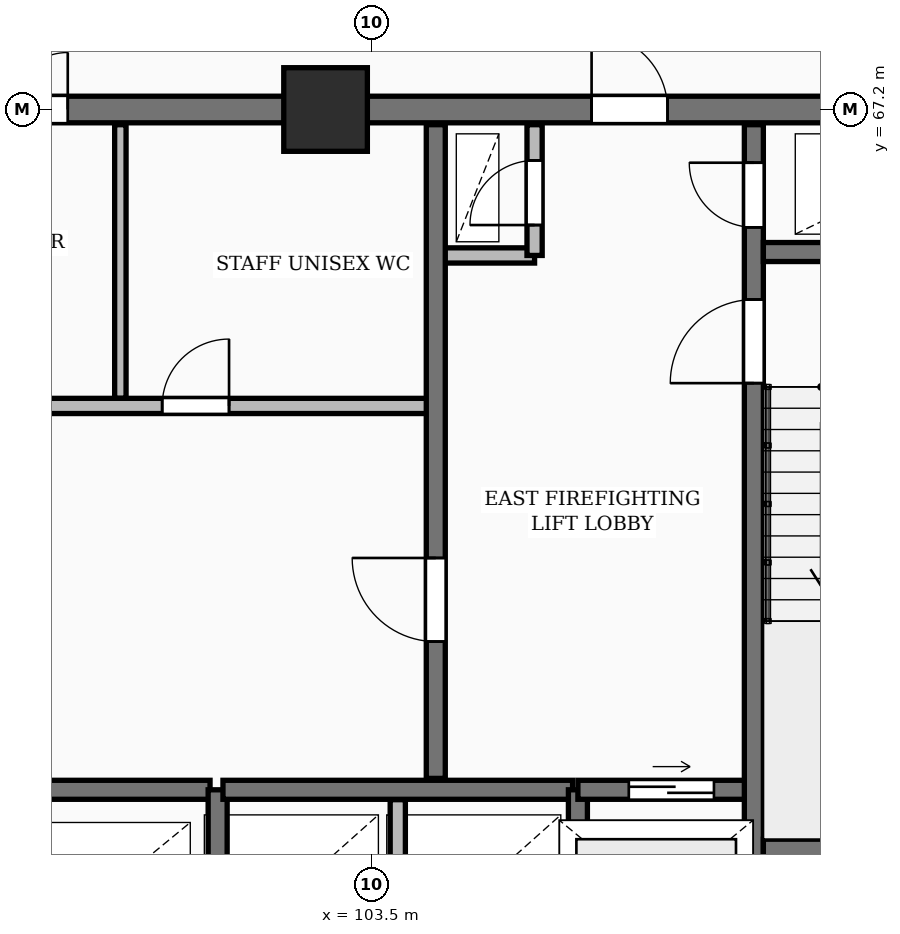
"""IFC4 building model, lengths in metres.
Left out: names, types, materials, properties, quantities, classifications, styles, units other than length and angle.
Written with IfcOpenShell. Run it as: python <this file> out.ifc"""

import sys

from ifc_helpers import new_model, si_unit, direction, frame, frame_2d, origin, origin_2d, place, context, subcontext, project, spatial, rectangle, extrude, element, fill, save


model = new_model("IFC4")
c1 = context("Model", 3, precision=1e-05, world=origin(), true_north=direction((0.0, 1.0)))
c2 = subcontext(c1, "Body", "Model", "MODEL_VIEW")
j1 = project(units=[si_unit("LENGTHUNIT", "METRE"), si_unit("PLANEANGLEUNIT", "RADIAN")], contexts=[c1])
p1 = place(None, origin())
s1 = spatial("IfcSite", under=j1, at=p1, CompositionType="ELEMENT")
p2 = place(p1, origin())
s2 = spatial("IfcBuilding", under=s1, at=p2, CompositionType="ELEMENT")
p3 = place(p2, frame((0.0, 0.0, 10.0)))
s3 = spatial("IfcBuildingStorey", under=s2, at=p3, CompositionType="ELEMENT", Elevation=10.0)
p4 = place(p3, frame((102.9, 67.2, 0.0), z_axis=(0.0, 0.0, 1.0), x_axis=(1.0, 0.0, 0.0)))
e1 = element("IfcColumn", 1, at=p4, inside=s3, PredefinedType="COLUMN", context=c2, shape_type="SweptSolid", body=[
    extrude(rectangle(XDim=1.1, YDim=1.1, at=origin_2d()), origin(), (0.0, 0.0, 1.0), 4.5),
])
p5 = place(p3, frame((75.95, 67.2, 0.0), z_axis=(0.0, 0.0, 1.0), x_axis=(1.0, 0.0, 0.0)))
e2 = element("IfcWall", 2, at=p5, inside=s3, PredefinedType="SHEAR", context=c2, shape_type="SweptSolid", body=[
    extrude(rectangle(XDim=36.3, YDim=0.35, at=frame_2d((18.15, 0.0))), origin(), (0.0, 0.0, 1.0), 4.5),
])
p6 = place(p5, frame((5.788, 0.0, 0.0)))
e3 = element("IfcOpeningElement", 3, at=p6, cuts=e2, PredefinedType="OPENING", context=c2, shape_type="SweptSolid", body=[
    extrude(rectangle(XDim=1.0, YDim=2.15, at=frame_2d((0.5, 1.075))), frame((0.0, 0.185, 0.0), z_axis=(0.0, -1.0, 0.0), x_axis=(1.0, 0.0, 0.0)), (0.0, 0.0, 1.0), 0.37),
])
p7 = place(p5, frame((22.058, 0.0, 0.0)))
e4 = element("IfcOpeningElement", 4, at=p7, cuts=e2, PredefinedType="OPENING", context=c2, shape_type="SweptSolid", body=[
    extrude(rectangle(XDim=1.5, YDim=2.2, at=frame_2d((0.75, 1.1))), frame((0.0, 0.185, 0.0), z_axis=(0.0, -1.0, 0.0), x_axis=(1.0, 0.0, 0.0)), (0.0, 0.0, 1.0), 0.37),
])
p8 = place(p5, frame((30.45, 0.0, 0.0)))
e5 = element("IfcOpeningElement", 5, at=p8, cuts=e2, PredefinedType="OPENING", context=c2, shape_type="SweptSolid", body=[
    extrude(rectangle(XDim=1.0, YDim=2.15, at=frame_2d((0.5, 1.075))), frame((0.0, 0.185, 0.0), z_axis=(0.0, -1.0, 0.0), x_axis=(1.0, 0.0, 0.0)), (0.0, 0.0, 1.0), 0.37),
])
p9 = place(p3, frame((93.02, 58.25, 0.0), z_axis=(0.0, 0.0, 1.0), x_axis=(1.0, 0.0, 0.0)))
e6 = element("IfcWall", 6, at=p9, inside=s3, PredefinedType="SHEAR", context=c2, shape_type="SweptSolid", body=[
    extrude(rectangle(XDim=8.36, YDim=0.25, at=frame_2d((4.18, 0.0))), origin(), (0.0, 0.0, 1.0), 4.5),
])
p10 = place(p3, frame((101.48, 55.4, 0.0), z_axis=(0.0, 0.0, 1.0), x_axis=(0.0, 1.0, 0.0)))
e7 = element("IfcWall", 7, at=p10, inside=s3, PredefinedType="SHEAR", context=c2, shape_type="SweptSolid", body=[
    extrude(rectangle(XDim=2.85, YDim=0.25, at=frame_2d((1.425, 0.0))), origin(), (0.0, 0.0, 1.0), 4.5),
])
p11 = place(p3, frame((103.85, 55.4, 0.0), z_axis=(0.0, 0.0, 1.0), x_axis=(0.0, 1.0, 0.0)))
e8 = element("IfcWall", 8, at=p11, inside=s3, PredefinedType="PARTITIONING", context=c2, shape_type="SweptSolid", body=[
    extrude(rectangle(XDim=2.72, YDim=0.2, at=frame_2d((1.36, 0.0))), origin(), (0.0, 0.0, 1.0), 4.2),
])
p12 = place(p3, frame((101.55, 58.25, 0.0), z_axis=(0.0, 0.0, 1.0), x_axis=(1.0, 0.0, 0.0)))
e9 = element("IfcWall", 9, at=p12, inside=s3, PredefinedType="SHEAR", context=c2, shape_type="SweptSolid", body=[
    extrude(rectangle(XDim=4.6, YDim=0.25, at=frame_2d((2.3, 0.0))), origin(), (0.0, 0.0, 1.0), 4.5),
])
p13 = place(p3, frame((106.22, 55.4, 0.0), z_axis=(0.0, 0.0, 1.0), x_axis=(0.0, 1.0, 0.0)))
e10 = element("IfcWall", 10, at=p13, inside=s3, PredefinedType="SHEAR", context=c2, shape_type="SweptSolid", body=[
    extrude(rectangle(XDim=2.85, YDim=0.25, at=frame_2d((1.425, 0.0))), origin(), (0.0, 0.0, 1.0), 4.5),
])
p14 = place(p3, frame((106.22, 58.25, 0.0), z_axis=(0.0, 0.0, 1.0), x_axis=(1.0, 0.0, 0.0)))
e11 = element("IfcWall", 11, at=p14, inside=s3, PredefinedType="SHEAR", context=c2, shape_type="SweptSolid", body=[
    extrude(rectangle(XDim=2.46, YDim=0.25, at=frame_2d((1.23, 0.0))), origin(), (0.0, 0.0, 1.0), 4.5),
])
p15 = place(p14, frame((0.67, 0.0, 0.0)))
e12 = element("IfcOpeningElement", 12, at=p15, cuts=e11, PredefinedType="OPENING", context=c2, shape_type="SweptSolid", body=[
    extrude(rectangle(XDim=1.12, YDim=2.12, at=frame_2d((0.56, 1.06))), frame((0.0, 0.135, 0.0), z_axis=(0.0, -1.0, 0.0), x_axis=(1.0, 0.0, 0.0)), (0.0, 0.0, 1.0), 0.27),
])
p16 = place(p3, frame((100.2, 63.4, 0.0), z_axis=(0.0, 0.0, 1.0), x_axis=(0.0, 1.0, 0.0)))
e13 = element("IfcWall", 13, at=p16, inside=s3, PredefinedType="PARTITIONING", context=c2, shape_type="SweptSolid", body=[
    extrude(rectangle(XDim=3.6, YDim=0.15, at=frame_2d((1.8, 0.0))), origin(), (0.0, 0.0, 1.0), 4.2),
])
p17 = place(p3, frame((84.42, 63.3, 0.0), z_axis=(0.0, 0.0, 1.0), x_axis=(1.0, 0.0, 0.0)))
e14 = element("IfcWall", 14, at=p17, inside=s3, PredefinedType="PARTITIONING", context=c2, shape_type="SweptSolid", body=[
    extrude(rectangle(XDim=19.83, YDim=0.2, at=frame_2d((9.915, 0.0))), origin(), (0.0, 0.0, 1.0), 4.2),
])
p18 = place(p17, frame((1.15, 0.0, 0.0)))
e15 = element("IfcOpeningElement", 15, at=p18, cuts=e14, PredefinedType="OPENING", context=c2, shape_type="SweptSolid", body=[
    extrude(rectangle(XDim=0.85, YDim=2.05, at=frame_2d((0.425, 1.025))), frame((0.0, 0.11, 0.0), z_axis=(0.0, -1.0, 0.0), x_axis=(1.0, 0.0, 0.0)), (0.0, 0.0, 1.0), 0.22),
])
p19 = place(p17, frame((3.25, 0.0, 0.0)))
e16 = element("IfcOpeningElement", 16, at=p19, cuts=e14, PredefinedType="OPENING", context=c2, shape_type="SweptSolid", body=[
    extrude(rectangle(XDim=0.85, YDim=2.05, at=frame_2d((0.425, 1.025))), frame((0.0, 0.11, 0.0), z_axis=(0.0, -1.0, 0.0), x_axis=(1.0, 0.0, 0.0)), (0.0, 0.0, 1.0), 0.22),
])
p20 = place(p17, frame((13.08, 0.0, 0.0)))
e17 = element("IfcOpeningElement", 17, at=p20, cuts=e14, PredefinedType="OPENING", context=c2, shape_type="SweptSolid", body=[
    extrude(rectangle(XDim=1.5, YDim=2.2, at=frame_2d((0.75, 1.1))), frame((0.0, 0.11, 0.0), z_axis=(0.0, -1.0, 0.0), x_axis=(1.0, 0.0, 0.0)), (0.0, 0.0, 1.0), 0.22),
])
p21 = place(p17, frame((6.68, 0.0, 0.0)))
e18 = element("IfcOpeningElement", 18, at=p21, cuts=e14, PredefinedType="OPENING", context=c2, shape_type="SweptSolid", body=[
    extrude(rectangle(XDim=0.92, YDim=2.08, at=frame_2d((0.46, 1.04))), frame((0.0, 0.11, 0.0), z_axis=(0.0, -1.0, 0.0), x_axis=(1.0, 0.0, 0.0)), (0.0, 0.0, 1.0), 0.22),
])
p22 = place(p17, frame((16.33, 0.0, 0.0)))
e19 = element("IfcOpeningElement", 19, at=p22, cuts=e14, PredefinedType="OPENING", context=c2, shape_type="SweptSolid", body=[
    extrude(rectangle(XDim=0.88, YDim=2.06, at=frame_2d((0.44, 1.03))), frame((0.0, 0.11, 0.0), z_axis=(0.0, -1.0, 0.0), x_axis=(1.0, 0.0, 0.0)), (0.0, 0.0, 1.0), 0.22),
])
p23 = place(p3, frame((104.45, 65.28, 0.0), z_axis=(0.0, 0.0, 1.0), x_axis=(1.0, 0.0, 0.0)))
e20 = element("IfcWall", 20, at=p23, inside=s3, PredefinedType="PARTITIONING", context=c2, shape_type="SweptSolid", body=[
    extrude(rectangle(XDim=1.2, YDim=0.2, at=frame_2d((0.6, 0.0))), origin(), (0.0, 0.0, 1.0), 4.2),
])
p24 = place(p3, frame((105.65, 65.28, 0.0), z_axis=(0.0, 0.0, 1.0), x_axis=(0.0, 1.0, 0.0)))
e21 = element("IfcWall", 21, at=p24, inside=s3, PredefinedType="PARTITIONING", context=c2, shape_type="SweptSolid", body=[
    extrude(rectangle(XDim=1.72, YDim=0.2, at=frame_2d((0.86, 0.0))), origin(), (0.0, 0.0, 1.0), 4.2),
])
p25 = place(p24, frame((0.4, 0.0, 0.0)))
e22 = element("IfcOpeningElement", 22, at=p25, cuts=e21, PredefinedType="OPENING", context=c2, shape_type="SweptSolid", body=[
    extrude(rectangle(XDim=0.85, YDim=2.05, at=frame_2d((0.425, 1.025))), frame((0.0, 0.11, 0.0), z_axis=(0.0, -1.0, 0.0), x_axis=(1.0, 0.0, 0.0)), (0.0, 0.0, 1.0), 0.22),
])
p26 = place(p3, frame((104.35, 58.4, 0.0), z_axis=(0.0, 0.0, 1.0), x_axis=(0.0, 1.0, 0.0)))
e23 = element("IfcWall", 23, at=p26, inside=s3, PredefinedType="SHEAR", context=c2, shape_type="SweptSolid", body=[
    extrude(rectangle(XDim=8.6, YDim=0.25, at=frame_2d((4.3, 0.0))), origin(), (0.0, 0.0, 1.0), 4.5),
])
p27 = place(p26, frame((1.8, 0.0, 0.0)))
e24 = element("IfcOpeningElement", 24, at=p27, cuts=e23, PredefinedType="OPENING", context=c2, shape_type="SweptSolid", body=[
    extrude(rectangle(XDim=1.1, YDim=2.1, at=frame_2d((0.55, 1.05))), frame((0.0, 0.135, 0.0), z_axis=(0.0, -1.0, 0.0), x_axis=(1.0, 0.0, 0.0)), (0.0, 0.0, 1.0), 0.27),
])
p28 = place(p3, frame((108.535, 55.4, 0.0), z_axis=(0.0, 0.0, 1.0), x_axis=(0.0, 1.0, 0.0)))
e25 = element("IfcWall", 25, at=p28, inside=s3, PredefinedType="SHEAR", context=c2, shape_type="SweptSolid", body=[
    extrude(rectangle(XDim=11.6, YDim=0.25, at=frame_2d((5.8, 0.0))), origin(), (0.0, 0.0, 1.0), 4.5),
])
p29 = place(p28, frame((8.2, 0.0, 0.0)))
e26 = element("IfcOpeningElement", 26, at=p29, cuts=e25, PredefinedType="OPENING", context=c2, shape_type="SweptSolid", body=[
    extrude(rectangle(XDim=1.1, YDim=2.1, at=frame_2d((0.55, 1.05))), frame((0.0, 0.135, 0.0), z_axis=(0.0, -1.0, 0.0), x_axis=(1.0, 0.0, 0.0)), (0.0, 0.0, 1.0), 0.27),
])
p30 = place(p28, frame((10.25, 0.0, 0.0)))
e27 = element("IfcOpeningElement", 27, at=p30, cuts=e25, PredefinedType="OPENING", context=c2, shape_type="SweptSolid", body=[
    extrude(rectangle(XDim=0.85, YDim=2.05, at=frame_2d((0.425, 1.025))), frame((0.0, 0.135, 0.0), z_axis=(0.0, -1.0, 0.0), x_axis=(1.0, 0.0, 0.0)), (0.0, 0.0, 1.0), 0.27),
])
for number, where, z_axis, x_axis in (
    (28, (108.66, 57.475, 0.0), (0.0, 0.0, 1.0), (1.0, 0.0, 0.0)),
    (29, (108.66, 65.325, 0.0), (0.0, 0.0, 1.0), (1.0, 0.0, 0.0)),
):
    element("IfcWall", number, at=place(p3, frame(where, z_axis=z_axis, x_axis=x_axis)), inside=s3, PredefinedType="SHEAR", context=c2, shape_type="SweptSolid", body=[
        extrude(rectangle(XDim=3.24, YDim=0.25, at=frame_2d((1.62, 0.0))), origin(), (0.0, 0.0, 1.0), 4.5),
    ])
p31 = place(p7, origin())
e30 = element("IfcDoor", 30, at=p31, inside=s3, OperationType="DOUBLE_DOOR_SINGLE_SWING", PredefinedType="DOOR", context=c2, shape_type="SweptSolid", body=[
    extrude(rectangle(XDim=1.5, YDim=2.2, at=frame_2d((0.75, 1.1))), frame((0.0, 0.025, 0.0), z_axis=(0.0, -1.0, 0.0), x_axis=(1.0, 0.0, 0.0)), (0.0, 0.0, 1.0), 0.05),
])
fill(e4, e30)
p32 = place(p8, origin())
e31 = element("IfcDoor", 31, at=p32, inside=s3, OperationType="SINGLE_SWING_LEFT", PredefinedType="DOOR", context=c2, shape_type="SweptSolid", body=[
    extrude(rectangle(XDim=1.0, YDim=2.15, at=frame_2d((0.5, 1.075))), frame((0.0, 0.025, 0.0), z_axis=(0.0, -1.0, 0.0), x_axis=(1.0, 0.0, 0.0)), (0.0, 0.0, 1.0), 0.05),
])
fill(e5, e31)
p33 = place(p15, origin())
e32 = element("IfcDoor", 32, at=p33, inside=s3, OperationType="SLIDING_TO_RIGHT", PredefinedType="DOOR", context=c2, shape_type="SweptSolid", body=[
    extrude(rectangle(XDim=1.12, YDim=2.12, at=frame_2d((0.56, 1.06))), frame((0.0, 0.025, 0.0), z_axis=(0.0, -1.0, 0.0), x_axis=(1.0, 0.0, 0.0)), (0.0, 0.0, 1.0), 0.05),
])
fill(e12, e32)
p34 = place(p22, origin())
e33 = element("IfcDoor", 33, at=p34, inside=s3, OperationType="SINGLE_SWING_RIGHT", PredefinedType="DOOR", context=c2, shape_type="SweptSolid", body=[
    extrude(rectangle(XDim=0.88, YDim=2.06, at=frame_2d((0.44, 1.03))), frame((0.0, 0.025, 0.0), z_axis=(0.0, -1.0, 0.0), x_axis=(1.0, 0.0, 0.0)), (0.0, 0.0, 1.0), 0.05),
])
fill(e19, e33)
p35 = place(p25, origin())
e34 = element("IfcDoor", 34, at=p35, inside=s3, OperationType="SINGLE_SWING_LEFT", PredefinedType="DOOR", context=c2, shape_type="SweptSolid", body=[
    extrude(rectangle(XDim=0.85, YDim=2.05, at=frame_2d((0.425, 1.025))), frame((0.0, 0.025, 0.0), z_axis=(0.0, -1.0, 0.0), x_axis=(1.0, 0.0, 0.0)), (0.0, 0.0, 1.0), 0.05),
])
fill(e22, e34)
p36 = place(p27, origin())
e35 = element("IfcDoor", 35, at=p36, inside=s3, OperationType="SINGLE_SWING_RIGHT", PredefinedType="DOOR", context=c2, shape_type="SweptSolid", body=[
    extrude(rectangle(XDim=1.1, YDim=2.1, at=frame_2d((0.55, 1.05))), frame((0.0, 0.025, 0.0), z_axis=(0.0, -1.0, 0.0), x_axis=(1.0, 0.0, 0.0)), (0.0, 0.0, 1.0), 0.05),
])
fill(e24, e35)
p37 = place(p29, origin())
e36 = element("IfcDoor", 36, at=p37, inside=s3, OperationType="SINGLE_SWING_LEFT", PredefinedType="DOOR", context=c2, shape_type="SweptSolid", body=[
    extrude(rectangle(XDim=1.1, YDim=2.1, at=frame_2d((0.55, 1.05))), frame((0.0, 0.025, 0.0), z_axis=(0.0, -1.0, 0.0), x_axis=(1.0, 0.0, 0.0)), (0.0, 0.0, 1.0), 0.05),
])
fill(e26, e36)
p38 = place(p30, origin())
e37 = element("IfcDoor", 37, at=p38, inside=s3, OperationType="SINGLE_SWING_RIGHT", PredefinedType="DOOR", context=c2, shape_type="SweptSolid", body=[
    extrude(rectangle(XDim=0.85, YDim=2.05, at=frame_2d((0.425, 1.025))), frame((0.0, 0.025, 0.0), z_axis=(0.0, -1.0, 0.0), x_axis=(1.0, 0.0, 0.0)), (0.0, 0.0, 1.0), 0.05),
])
fill(e27, e37)
save(model, sys.argv[1])
